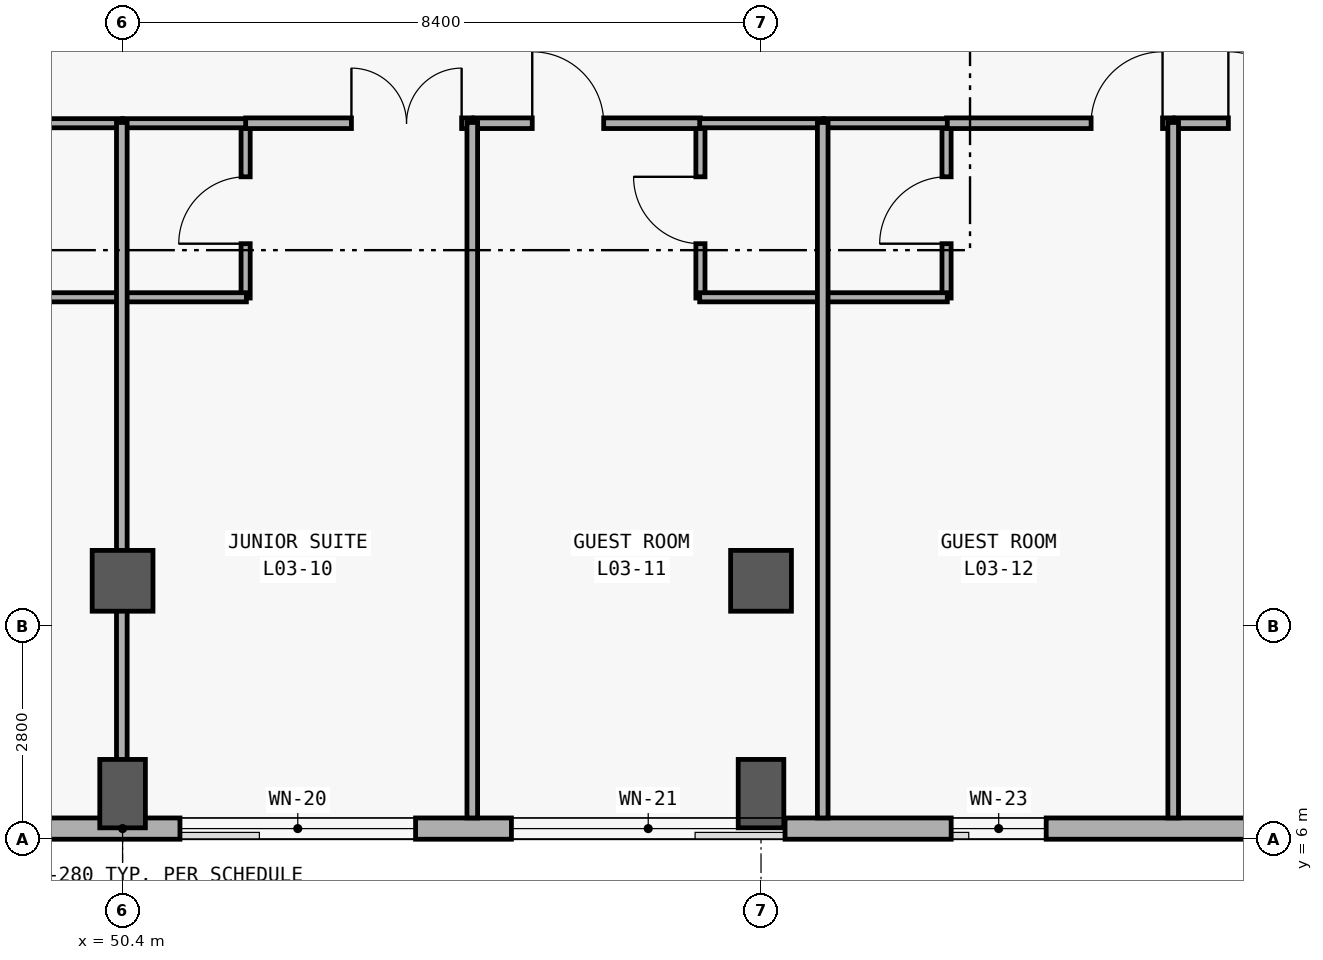
"""IFC4 building model, lengths in metres.
Left out: names, types, materials, properties, quantities, classifications, styles, units other than length and angle.
Written with IfcOpenShell. Run it as: python <this file> out.ifc"""

import sys

from ifc_helpers import new_model, si_unit, direction, frame, frame_2d, origin, origin_2d, place, context, subcontext, project, spatial, rectangle, extrude, element, fill, save


model = new_model("IFC4")
c1 = context("Model", 3, precision=1e-05, world=origin(), true_north=direction((0.0, 1.0)))
c2 = subcontext(c1, "Body", "Model", "MODEL_VIEW")
j1 = project(units=[si_unit("LENGTHUNIT", "METRE"), si_unit("PLANEANGLEUNIT", "RADIAN")], contexts=[c1])
p1 = place(None, origin())
s1 = spatial("IfcSite", under=j1, at=p1, CompositionType="ELEMENT")
p2 = place(p1, origin())
s2 = spatial("IfcBuilding", under=s1, at=p2, CompositionType="ELEMENT")
p3 = place(p2, frame((0.0, 0.0, 15.0)))
s3 = spatial("IfcBuildingStorey", under=s2, at=p3, CompositionType="ELEMENT", Elevation=15.0)
p4 = place(p3, frame((50.4, 6.6, 0.0), z_axis=(0.0, 0.0, 1.0), x_axis=(0.0, 1.0, 0.0)))
e1 = element("IfcColumn", 1, at=p4, inside=s3, PredefinedType="COLUMN", context=c2, shape_type="SweptSolid", body=[
    extrude(rectangle(XDim=0.6, YDim=0.9, at=origin_2d()), origin(), (0.0, 0.0, 1.0), 4.2),
])
p5 = place(p3, frame((50.4, 9.4, 0.0), z_axis=(0.0, 0.0, 1.0), x_axis=(1.0, 0.0, 0.0)))
e2 = element("IfcColumn", 2, at=p5, inside=s3, PredefinedType="COLUMN", context=c2, shape_type="SweptSolid", body=[
    extrude(rectangle(XDim=0.8, YDim=0.8, at=origin_2d()), origin(), (0.0, 0.0, 1.0), 4.2),
])
p6 = place(p3, frame((58.8, 6.6, 0.0), z_axis=(0.0, 0.0, 1.0), x_axis=(0.0, 1.0, 0.0)))
e3 = element("IfcColumn", 3, at=p6, inside=s3, PredefinedType="COLUMN", context=c2, shape_type="SweptSolid", body=[
    extrude(rectangle(XDim=0.6, YDim=0.9, at=origin_2d()), origin(), (0.0, 0.0, 1.0), 4.2),
])
p7 = place(p3, frame((58.8, 9.4, 0.0), z_axis=(0.0, 0.0, 1.0), x_axis=(1.0, 0.0, 0.0)))
e4 = element("IfcColumn", 4, at=p7, inside=s3, PredefinedType="COLUMN", context=c2, shape_type="SweptSolid", body=[
    extrude(rectangle(XDim=0.8, YDim=0.8, at=origin_2d()), origin(), (0.0, 0.0, 1.0), 4.2),
])
p8 = place(p3, frame((92.12, 6.14, 0.0), z_axis=(0.0, 0.0, 1.0), x_axis=(-1.0, 0.0, 0.0)))
e5 = element("IfcWall", 5, at=p8, inside=s3, PredefinedType="SOLIDWALL", context=c2, shape_type="SweptSolid", body=[
    extrude(rectangle(XDim=83.44, YDim=0.28, at=frame_2d((41.72, 0.0))), origin(), (0.0, 0.0, 1.0), 3.92),
])
p9 = place(p8, frame((79.49, 0.0, 0.85)))
e6 = element("IfcOpeningElement", 6, at=p9, cuts=e5, PredefinedType="OPENING", context=c2, shape_type="SweptSolid", body=[
    extrude(rectangle(XDim=2.85, YDim=1.85, at=frame_2d((1.425, 0.925))), frame((0.0, 0.15, 0.0), z_axis=(0.0, -1.0, 0.0), x_axis=(1.0, 0.0, 0.0)), (0.0, 0.0, 1.0), 0.3),
])
p10 = place(p8, frame((74.704, 0.0, 0.85)))
e7 = element("IfcOpeningElement", 7, at=p10, cuts=e5, PredefinedType="OPENING", context=c2, shape_type="SweptSolid", body=[
    extrude(rectangle(XDim=3.2, YDim=1.95, at=frame_2d((1.6, 0.975))), frame((0.0, 0.15, 0.0), z_axis=(0.0, -1.0, 0.0), x_axis=(1.0, 0.0, 0.0)), (0.0, 0.0, 1.0), 0.3),
])
p11 = place(p8, frame((69.942, 0.0, 0.85)))
e8 = element("IfcOpeningElement", 8, at=p11, cuts=e5, PredefinedType="OPENING", context=c2, shape_type="SweptSolid", body=[
    extrude(rectangle(XDim=3.5, YDim=2.0, at=frame_2d((1.75, 1.0))), frame((0.0, 0.15, 0.0), z_axis=(0.0, -1.0, 0.0), x_axis=(1.0, 0.0, 0.0)), (0.0, 0.0, 1.0), 0.3),
])
p12 = place(p8, frame((66.382, 0.0, 0.85)))
e9 = element("IfcOpeningElement", 9, at=p12, cuts=e5, PredefinedType="OPENING", context=c2, shape_type="SweptSolid", body=[
    extrude(rectangle(XDim=1.4, YDim=1.6, at=frame_2d((0.7, 0.8))), frame((0.0, 0.15, 0.0), z_axis=(0.0, -1.0, 0.0), x_axis=(1.0, 0.0, 0.0)), (0.0, 0.0, 1.0), 0.3),
])
p13 = place(p8, frame((61.67, 0.0, 0.85)))
e10 = element("IfcOpeningElement", 10, at=p13, cuts=e5, PredefinedType="OPENING", context=c2, shape_type="SweptSolid", body=[
    extrude(rectangle(XDim=1.6, YDim=1.6, at=frame_2d((0.8, 0.8))), frame((0.0, 0.15, 0.0), z_axis=(0.0, -1.0, 0.0), x_axis=(1.0, 0.0, 0.0)), (0.0, 0.0, 1.0), 0.3),
])
p14 = place(p8, frame((56.959, 0.0, 0.85)))
e11 = element("IfcOpeningElement", 11, at=p14, cuts=e5, PredefinedType="OPENING", context=c2, shape_type="SweptSolid", body=[
    extrude(rectangle(XDim=1.8, YDim=1.6, at=frame_2d((0.9, 0.8))), frame((0.0, 0.15, 0.0), z_axis=(0.0, -1.0, 0.0), x_axis=(1.0, 0.0, 0.0)), (0.0, 0.0, 1.0), 0.3),
])
p15 = place(p8, frame((52.248, 0.0, 0.85)))
e12 = element("IfcOpeningElement", 12, at=p15, cuts=e5, PredefinedType="OPENING", context=c2, shape_type="SweptSolid", body=[
    extrude(rectangle(XDim=2.0, YDim=1.65, at=frame_2d((1.0, 0.825))), frame((0.0, 0.15, 0.0), z_axis=(0.0, -1.0, 0.0), x_axis=(1.0, 0.0, 0.0)), (0.0, 0.0, 1.0), 0.3),
])
p16 = place(p8, frame((47.536, 0.0, 0.85)))
e13 = element("IfcOpeningElement", 13, at=p16, cuts=e5, PredefinedType="OPENING", context=c2, shape_type="SweptSolid", body=[
    extrude(rectangle(XDim=2.2, YDim=1.65, at=frame_2d((1.1, 0.825))), frame((0.0, 0.15, 0.0), z_axis=(0.0, -1.0, 0.0), x_axis=(1.0, 0.0, 0.0)), (0.0, 0.0, 1.0), 0.3),
])
p17 = place(p8, frame((42.726, 0.0, 0.85)))
e14 = element("IfcOpeningElement", 14, at=p17, cuts=e5, PredefinedType="OPENING", context=c2, shape_type="SweptSolid", body=[
    extrude(rectangle(XDim=2.6, YDim=2.2, at=frame_2d((1.3, 1.1))), frame((0.0, 0.15, 0.0), z_axis=(0.0, -1.0, 0.0), x_axis=(1.0, 0.0, 0.0)), (0.0, 0.0, 1.0), 0.3),
])
p18 = place(p8, frame((37.865, 0.0, 0.85)))
e15 = element("IfcOpeningElement", 15, at=p18, cuts=e5, PredefinedType="OPENING", context=c2, shape_type="SweptSolid", body=[
    extrude(rectangle(XDim=3.1, YDim=2.2, at=frame_2d((1.55, 1.1))), frame((0.0, 0.15, 0.0), z_axis=(0.0, -1.0, 0.0), x_axis=(1.0, 0.0, 0.0)), (0.0, 0.0, 1.0), 0.3),
])
p19 = place(p8, frame((33.004, 0.0, 0.85)))
e16 = element("IfcOpeningElement", 16, at=p19, cuts=e5, PredefinedType="OPENING", context=c2, shape_type="SweptSolid", body=[
    extrude(rectangle(XDim=3.6, YDim=2.3, at=frame_2d((1.8, 1.15))), frame((0.0, 0.15, 0.0), z_axis=(0.0, -1.0, 0.0), x_axis=(1.0, 0.0, 0.0)), (0.0, 0.0, 1.0), 0.3),
])
p20 = place(p8, frame((29.568, 0.0, 0.85)))
e17 = element("IfcOpeningElement", 17, at=p20, cuts=e5, PredefinedType="OPENING", context=c2, shape_type="SweptSolid", body=[
    extrude(rectangle(XDim=1.25, YDim=1.45, at=frame_2d((0.625, 0.725))), frame((0.0, 0.15, 0.0), z_axis=(0.0, -1.0, 0.0), x_axis=(1.0, 0.0, 0.0)), (0.0, 0.0, 1.0), 0.3),
])
p21 = place(p8, frame((24.907, 0.0, 0.85)))
e18 = element("IfcOpeningElement", 18, at=p21, cuts=e5, PredefinedType="OPENING", context=c2, shape_type="SweptSolid", body=[
    extrude(rectangle(XDim=1.35, YDim=1.55, at=frame_2d((0.675, 0.775))), frame((0.0, 0.15, 0.0), z_axis=(0.0, -1.0, 0.0), x_axis=(1.0, 0.0, 0.0)), (0.0, 0.0, 1.0), 0.3),
])
p22 = place(p8, frame((20.245, 0.0, 0.85)))
e19 = element("IfcOpeningElement", 19, at=p22, cuts=e5, PredefinedType="OPENING", context=c2, shape_type="SweptSolid", body=[
    extrude(rectangle(XDim=1.45, YDim=1.65, at=frame_2d((0.725, 0.825))), frame((0.0, 0.15, 0.0), z_axis=(0.0, -1.0, 0.0), x_axis=(1.0, 0.0, 0.0)), (0.0, 0.0, 1.0), 0.3),
])
p23 = place(p8, frame((15.584, 0.0, 0.85)))
e20 = element("IfcOpeningElement", 20, at=p23, cuts=e5, PredefinedType="OPENING", context=c2, shape_type="SweptSolid", body=[
    extrude(rectangle(XDim=1.55, YDim=1.65, at=frame_2d((0.775, 0.825))), frame((0.0, 0.15, 0.0), z_axis=(0.0, -1.0, 0.0), x_axis=(1.0, 0.0, 0.0)), (0.0, 0.0, 1.0), 0.3),
])
p24 = place(p8, frame((10.898, 0.0, 0.85)))
e21 = element("IfcOpeningElement", 21, at=p24, cuts=e5, PredefinedType="OPENING", context=c2, shape_type="SweptSolid", body=[
    extrude(rectangle(XDim=1.7, YDim=2.0, at=frame_2d((0.85, 1.0))), frame((0.0, 0.15, 0.0), z_axis=(0.0, -1.0, 0.0), x_axis=(1.0, 0.0, 0.0)), (0.0, 0.0, 1.0), 0.3),
])
p25 = place(p8, frame((5.987, 0.0, 0.85)))
e22 = element("IfcOpeningElement", 22, at=p25, cuts=e5, PredefinedType="OPENING", context=c2, shape_type="SweptSolid", body=[
    extrude(rectangle(XDim=2.3, YDim=2.05, at=frame_2d((1.15, 1.025))), frame((0.0, 0.15, 0.0), z_axis=(0.0, -1.0, 0.0), x_axis=(1.0, 0.0, 0.0)), (0.0, 0.0, 1.0), 0.3),
])
p26 = place(p8, frame((1.151, 0.0, 0.85)))
e23 = element("IfcOpeningElement", 23, at=p26, cuts=e5, PredefinedType="OPENING", context=c2, shape_type="SweptSolid", body=[
    extrude(rectangle(XDim=2.75, YDim=2.1, at=frame_2d((1.375, 1.05))), frame((0.0, 0.15, 0.0), z_axis=(0.0, -1.0, 0.0), x_axis=(1.0, 0.0, 0.0)), (0.0, 0.0, 1.0), 0.3),
])
p27 = place(p3, frame((52.019, 13.12, 0.0), z_axis=(0.0, 0.0, 1.0), x_axis=(0.0, 1.0, 0.0)))
e24 = element("IfcWall", 24, at=p27, inside=s3, PredefinedType="PARTITIONING", context=c2, shape_type="SweptSolid", body=[
    extrude(rectangle(XDim=2.31, YDim=0.12, at=frame_2d((1.155, 0.0))), origin(), (0.0, 0.0, 1.0), 3.02),
])
p28 = place(p27, frame((0.715, 0.0, 0.0)))
e25 = element("IfcOpeningElement", 25, at=p28, cuts=e24, PredefinedType="OPENING", context=c2, shape_type="SweptSolid", body=[
    extrude(rectangle(XDim=0.88, YDim=2.15, at=frame_2d((0.44, 1.075))), frame((0.0, 0.07, 0.0), z_axis=(0.0, -1.0, 0.0), x_axis=(1.0, 0.0, 0.0)), (0.0, 0.0, 1.0), 0.14),
])
p29 = place(p3, frame((58.003, 13.12, 0.0), z_axis=(0.0, 0.0, 1.0), x_axis=(0.0, 1.0, 0.0)))
e26 = element("IfcWall", 26, at=p29, inside=s3, PredefinedType="PARTITIONING", context=c2, shape_type="SweptSolid", body=[
    extrude(rectangle(XDim=2.31, YDim=0.12, at=frame_2d((1.155, 0.0))), origin(), (0.0, 0.0, 1.0), 3.02),
])
p30 = place(p29, frame((0.715, 0.0, 0.0)))
e27 = element("IfcOpeningElement", 27, at=p30, cuts=e26, PredefinedType="OPENING", context=c2, shape_type="SweptSolid", body=[
    extrude(rectangle(XDim=0.88, YDim=2.15, at=frame_2d((0.44, 1.075))), frame((0.0, 0.07, 0.0), z_axis=(0.0, -1.0, 0.0), x_axis=(1.0, 0.0, 0.0)), (0.0, 0.0, 1.0), 0.14),
])
p31 = place(p3, frame((61.241, 13.12, 0.0), z_axis=(0.0, 0.0, 1.0), x_axis=(0.0, 1.0, 0.0)))
e28 = element("IfcWall", 28, at=p31, inside=s3, PredefinedType="PARTITIONING", context=c2, shape_type="SweptSolid", body=[
    extrude(rectangle(XDim=2.31, YDim=0.12, at=frame_2d((1.155, 0.0))), origin(), (0.0, 0.0, 1.0), 3.02),
])
p32 = place(p31, frame((0.715, 0.0, 0.0)))
e29 = element("IfcOpeningElement", 29, at=p32, cuts=e28, PredefinedType="OPENING", context=c2, shape_type="SweptSolid", body=[
    extrude(rectangle(XDim=0.88, YDim=2.15, at=frame_2d((0.44, 1.075))), frame((0.0, 0.07, 0.0), z_axis=(0.0, -1.0, 0.0), x_axis=(1.0, 0.0, 0.0)), (0.0, 0.0, 1.0), 0.14),
])
p33 = place(p3, frame((52.019, 15.42, 0.0), z_axis=(0.0, 0.0, 1.0), x_axis=(1.0, 0.0, 0.0)))
e30 = element("IfcWall", 30, at=p33, inside=s3, PredefinedType="PARTITIONING", context=c2, shape_type="SweptSolid", body=[
    extrude(rectangle(XDim=2.982, YDim=0.14, at=frame_2d((1.491, 0.0))), origin(), (0.0, 0.0, 1.0), 3.02),
])
p34 = place(p33, frame((1.392, 0.0, 0.0)))
e31 = element("IfcOpeningElement", 31, at=p34, cuts=e30, PredefinedType="OPENING", context=c2, shape_type="SweptSolid", body=[
    extrude(rectangle(XDim=1.45, YDim=2.3, at=frame_2d((0.725, 1.15))), frame((0.0, 0.08, 0.0), z_axis=(0.0, -1.0, 0.0), x_axis=(1.0, 0.0, 0.0)), (0.0, 0.0, 1.0), 0.16),
])
p35 = place(p3, frame((55.021, 15.42, 0.0), z_axis=(0.0, 0.0, 1.0), x_axis=(1.0, 0.0, 0.0)))
e32 = element("IfcWall", 32, at=p35, inside=s3, PredefinedType="PARTITIONING", context=c2, shape_type="SweptSolid", body=[
    extrude(rectangle(XDim=2.982, YDim=0.14, at=frame_2d((1.491, 0.0))), origin(), (0.0, 0.0, 1.0), 3.02),
])
p36 = place(p35, frame((0.769, 0.0, 0.0)))
e33 = element("IfcOpeningElement", 33, at=p36, cuts=e32, PredefinedType="OPENING", context=c2, shape_type="SweptSolid", body=[
    extrude(rectangle(XDim=0.94, YDim=2.2, at=frame_2d((0.47, 1.1))), frame((0.0, 0.08, 0.0), z_axis=(0.0, -1.0, 0.0), x_axis=(1.0, 0.0, 0.0)), (0.0, 0.0, 1.0), 0.16),
])
p37 = place(p3, frame((61.241, 15.42, 0.0), z_axis=(0.0, 0.0, 1.0), x_axis=(1.0, 0.0, 0.0)))
e34 = element("IfcWall", 34, at=p37, inside=s3, PredefinedType="PARTITIONING", context=c2, shape_type="SweptSolid", body=[
    extrude(rectangle(XDim=2.982, YDim=0.14, at=frame_2d((1.491, 0.0))), origin(), (0.0, 0.0, 1.0), 3.02),
])
p38 = place(p37, frame((1.902, 0.0, 0.0)))
e35 = element("IfcOpeningElement", 35, at=p38, cuts=e34, PredefinedType="OPENING", context=c2, shape_type="SweptSolid", body=[
    extrude(rectangle(XDim=0.94, YDim=2.2, at=frame_2d((0.47, 1.1))), frame((0.0, 0.08, 0.0), z_axis=(0.0, -1.0, 0.0), x_axis=(1.0, 0.0, 0.0)), (0.0, 0.0, 1.0), 0.16),
])
p39 = place(p3, frame((64.243, 15.42, 0.0), z_axis=(0.0, 0.0, 1.0), x_axis=(1.0, 0.0, 0.0)))
e36 = element("IfcWall", 36, at=p39, inside=s3, PredefinedType="PARTITIONING", context=c2, shape_type="SweptSolid", body=[
    extrude(rectangle(XDim=2.982, YDim=0.14, at=frame_2d((1.491, 0.0))), origin(), (0.0, 0.0, 1.0), 3.02),
])
p40 = place(p39, frame((0.706, 0.0, 0.0)))
e37 = element("IfcOpeningElement", 37, at=p40, cuts=e36, PredefinedType="OPENING", context=c2, shape_type="SweptSolid", body=[
    extrude(rectangle(XDim=0.94, YDim=2.2, at=frame_2d((0.47, 1.1))), frame((0.0, 0.08, 0.0), z_axis=(0.0, -1.0, 0.0), x_axis=(1.0, 0.0, 0.0)), (0.0, 0.0, 1.0), 0.16),
])
for number, where, z_axis, x_axis in (
    (38, (48.771, 13.13, 0.0), (0.0, 0.0, 1.0), (1.0, 0.0, 0.0)),
    (39, (48.771, 15.42, 0.0), (0.0, 0.0, 1.0), (1.0, 0.0, 0.0)),
):
    element("IfcWall", number, at=place(p3, frame(where, z_axis=z_axis, x_axis=x_axis)), inside=s3, PredefinedType="PARTITIONING", context=c2, shape_type="SweptSolid", body=[
        extrude(rectangle(XDim=1.629, YDim=0.12, at=frame_2d((0.814, 0.0))), origin(), (0.0, 0.0, 1.0), 3.02),
    ])
p41 = place(p3, frame((50.4, 13.13, 0.0), z_axis=(0.0, 0.0, 1.0), x_axis=(1.0, 0.0, 0.0)))
e40 = element("IfcWall", 40, at=p41, inside=s3, PredefinedType="PARTITIONING", context=c2, shape_type="SweptSolid", body=[
    extrude(rectangle(XDim=1.629, YDim=0.12, at=frame_2d((0.814, 0.0))), origin(), (0.0, 0.0, 1.0), 3.02),
])
p42 = place(p3, frame((50.4, 15.42, 0.0), z_axis=(0.0, 0.0, 1.0), x_axis=(1.0, 0.0, 0.0)))
e41 = element("IfcWall", 41, at=p42, inside=s3, PredefinedType="PARTITIONING", context=c2, shape_type="SweptSolid", body=[
    extrude(rectangle(XDim=1.619, YDim=0.12, at=frame_2d((0.81, 0.0))), origin(), (0.0, 0.0, 1.0), 3.02),
])
for number, where, z_axis, x_axis in (
    (42, (57.993, 13.13, 0.0), (0.0, 0.0, 1.0), (1.0, 0.0, 0.0)),
    (43, (57.993, 15.42, 0.0), (0.0, 0.0, 1.0), (1.0, 0.0, 0.0)),
):
    element("IfcWall", number, at=place(p3, frame(where, z_axis=z_axis, x_axis=x_axis)), inside=s3, PredefinedType="PARTITIONING", context=c2, shape_type="SweptSolid", body=[
        extrude(rectangle(XDim=1.629, YDim=0.12, at=frame_2d((0.814, 0.0))), origin(), (0.0, 0.0, 1.0), 3.02),
    ])
for number, where, z_axis, x_axis in (
    (44, (59.622, 13.13, 0.0), (0.0, 0.0, 1.0), (1.0, 0.0, 0.0)),
    (45, (59.622, 15.42, 0.0), (0.0, 0.0, 1.0), (1.0, 0.0, 0.0)),
):
    element("IfcWall", number, at=place(p3, frame(where, z_axis=z_axis, x_axis=x_axis)), inside=s3, PredefinedType="PARTITIONING", context=c2, shape_type="SweptSolid", body=[
        extrude(rectangle(XDim=1.629, YDim=0.12, at=frame_2d((0.814, 0.0))), origin(), (0.0, 0.0, 1.0), 3.02),
    ])
for number, where, z_axis, x_axis in (
    (46, (50.39, 6.28, 0.0), (0.0, 0.0, 1.0), (0.0, 1.0, 0.0)),
    (47, (55.001, 6.28, 0.0), (0.0, 0.0, 1.0), (0.0, 1.0, 0.0)),
    (48, (59.612, 6.28, 0.0), (0.0, 0.0, 1.0), (0.0, 1.0, 0.0)),
    (49, (64.223, 6.28, 0.0), (0.0, 0.0, 1.0), (0.0, 1.0, 0.0)),
):
    element("IfcWall", number, at=place(p3, frame(where, z_axis=z_axis, x_axis=x_axis)), inside=s3, PredefinedType="PARTITIONING", context=c2, shape_type="SweptSolid", body=[
        extrude(rectangle(XDim=9.15, YDim=0.14, at=frame_2d((4.575, 0.0))), origin(), (0.0, 0.0, 1.0), 3.02),
    ])
p43 = place(p18, origin())
e50 = element("IfcWindow", 50, at=p43, inside=s3, PartitioningType="SINGLE_PANEL", PredefinedType="WINDOW", context=c2, shape_type="SweptSolid", body=[
    extrude(rectangle(XDim=3.1, YDim=2.2, at=frame_2d((1.55, 1.1))), frame((0.0, 0.03, 0.0), z_axis=(0.0, -1.0, 0.0), x_axis=(1.0, 0.0, 0.0)), (0.0, 0.0, 1.0), 0.06),
])
fill(e15, e50)
p44 = place(p19, origin())
e51 = element("IfcWindow", 51, at=p44, inside=s3, PartitioningType="SINGLE_PANEL", PredefinedType="WINDOW", context=c2, shape_type="SweptSolid", body=[
    extrude(rectangle(XDim=3.6, YDim=2.3, at=frame_2d((1.8, 1.15))), frame((0.0, 0.03, 0.0), z_axis=(0.0, -1.0, 0.0), x_axis=(1.0, 0.0, 0.0)), (0.0, 0.0, 1.0), 0.06),
])
fill(e16, e51)
p45 = place(p20, origin())
e52 = element("IfcWindow", 52, at=p45, inside=s3, PartitioningType="SINGLE_PANEL", PredefinedType="WINDOW", context=c2, shape_type="SweptSolid", body=[
    extrude(rectangle(XDim=1.25, YDim=1.45, at=frame_2d((0.625, 0.725))), frame((0.0, 0.03, 0.0), z_axis=(0.0, -1.0, 0.0), x_axis=(1.0, 0.0, 0.0)), (0.0, 0.0, 1.0), 0.06),
])
fill(e17, e52)
p46 = place(p28, origin())
e53 = element("IfcDoor", 53, at=p46, inside=s3, OperationType="SINGLE_SWING_LEFT", PredefinedType="DOOR", context=c2, shape_type="SweptSolid", body=[
    extrude(rectangle(XDim=0.88, YDim=2.15, at=frame_2d((0.44, 1.075))), frame((0.0, 0.025, 0.0), z_axis=(0.0, -1.0, 0.0), x_axis=(1.0, 0.0, 0.0)), (0.0, 0.0, 1.0), 0.05),
])
fill(e25, e53)
p47 = place(p30, origin())
e54 = element("IfcDoor", 54, at=p47, inside=s3, OperationType="SINGLE_SWING_RIGHT", PredefinedType="DOOR", context=c2, shape_type="SweptSolid", body=[
    extrude(rectangle(XDim=0.88, YDim=2.15, at=frame_2d((0.44, 1.075))), frame((0.0, 0.025, 0.0), z_axis=(0.0, -1.0, 0.0), x_axis=(1.0, 0.0, 0.0)), (0.0, 0.0, 1.0), 0.05),
])
fill(e27, e54)
p48 = place(p32, origin())
e55 = element("IfcDoor", 55, at=p48, inside=s3, OperationType="SINGLE_SWING_LEFT", PredefinedType="DOOR", context=c2, shape_type="SweptSolid", body=[
    extrude(rectangle(XDim=0.88, YDim=2.15, at=frame_2d((0.44, 1.075))), frame((0.0, 0.025, 0.0), z_axis=(0.0, -1.0, 0.0), x_axis=(1.0, 0.0, 0.0)), (0.0, 0.0, 1.0), 0.05),
])
fill(e29, e55)
p49 = place(p34, origin())
e56 = element("IfcDoor", 56, at=p49, inside=s3, OperationType="DOUBLE_DOOR_SINGLE_SWING", PredefinedType="DOOR", context=c2, shape_type="SweptSolid", body=[
    extrude(rectangle(XDim=1.45, YDim=2.3, at=frame_2d((0.725, 1.15))), frame((0.0, 0.025, 0.0), z_axis=(0.0, -1.0, 0.0), x_axis=(1.0, 0.0, 0.0)), (0.0, 0.0, 1.0), 0.05),
])
fill(e31, e56)
p50 = place(p36, origin())
e57 = element("IfcDoor", 57, at=p50, inside=s3, OperationType="SINGLE_SWING_LEFT", PredefinedType="DOOR", context=c2, shape_type="SweptSolid", body=[
    extrude(rectangle(XDim=0.94, YDim=2.2, at=frame_2d((0.47, 1.1))), frame((0.0, 0.025, 0.0), z_axis=(0.0, -1.0, 0.0), x_axis=(1.0, 0.0, 0.0)), (0.0, 0.0, 1.0), 0.05),
])
fill(e33, e57)
p51 = place(p38, origin())
e58 = element("IfcDoor", 58, at=p51, inside=s3, OperationType="SINGLE_SWING_RIGHT", PredefinedType="DOOR", context=c2, shape_type="SweptSolid", body=[
    extrude(rectangle(XDim=0.94, YDim=2.2, at=frame_2d((0.47, 1.1))), frame((0.0, 0.025, 0.0), z_axis=(0.0, -1.0, 0.0), x_axis=(1.0, 0.0, 0.0)), (0.0, 0.0, 1.0), 0.05),
])
fill(e35, e58)
p52 = place(p40, origin())
e59 = element("IfcDoor", 59, at=p52, inside=s3, OperationType="SINGLE_SWING_LEFT", PredefinedType="DOOR", context=c2, shape_type="SweptSolid", body=[
    extrude(rectangle(XDim=0.94, YDim=2.2, at=frame_2d((0.47, 1.1))), frame((0.0, 0.025, 0.0), z_axis=(0.0, -1.0, 0.0), x_axis=(1.0, 0.0, 0.0)), (0.0, 0.0, 1.0), 0.05),
])
fill(e37, e59)
save(model, sys.argv[1])
